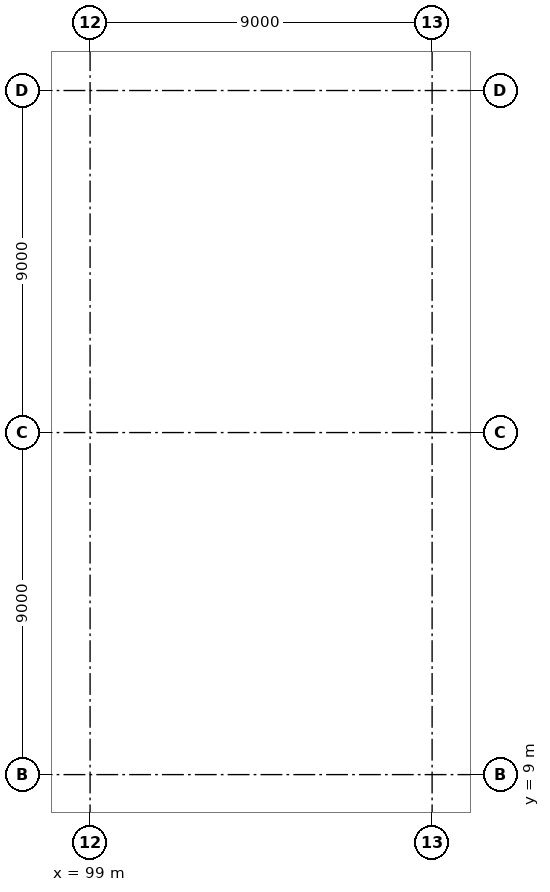
"""IFC4 building model, lengths in metres.
Left out: names, types, materials, properties, quantities, classifications, styles, units other than length and angle.
Written with IfcOpenShell. Run it as: python <this file> out.ifc"""

import sys

from ifc_helpers import new_model, si_unit, direction, frame, frame_2d, origin, origin_2d, place, context, subcontext, project, spatial, rectangle, hollow_rectangle, hollow_circle, extrude, element, fill, save


model = new_model("IFC4")
c1 = context("Model", 3, precision=1e-05, world=origin(), true_north=direction((0.0, 1.0)))
c2 = subcontext(c1, "Body", "Model", "MODEL_VIEW")
j1 = project(units=[si_unit("LENGTHUNIT", "METRE"), si_unit("PLANEANGLEUNIT", "RADIAN")], contexts=[c1])
p1 = place(None, origin())
s1 = spatial("IfcSite", under=j1, at=p1, CompositionType="ELEMENT")
p2 = place(p1, origin())
s2 = spatial("IfcBuilding", under=s1, at=p2, CompositionType="ELEMENT")
p3 = place(p2, frame((0.0, 0.0, 9.2)))
s3 = spatial("IfcBuildingStorey", under=s2, at=p3, CompositionType="ELEMENT", Elevation=9.2)
p4 = place(p3, frame((99.0, 9.0, 0.0), z_axis=(0.0, 0.0, 1.0), x_axis=(1.0, 0.0, 0.0)))
e1 = element("IfcColumn", 1, at=p4, inside=s3, PredefinedType="COLUMN", context=c2, shape_type="SweptSolid", body=[
    extrude(hollow_circle(Radius=0.203, WallThickness=0.013, at=origin_2d()), origin(), (0.0, 0.0, 1.0), 4.2),
])
p5 = place(p3, frame((99.0, 18.0, 0.0), z_axis=(0.0, 0.0, 1.0), x_axis=(1.0, 0.0, 0.0)))
e2 = element("IfcColumn", 2, at=p5, inside=s3, PredefinedType="COLUMN", context=c2, shape_type="SweptSolid", body=[
    extrude(hollow_circle(Radius=0.162, WallThickness=0.01, at=origin_2d()), origin(), (0.0, 0.0, 1.0), 4.2),
])
p6 = place(p3, frame((108.0, 18.0, 0.0), z_axis=(0.0, 0.0, 1.0), x_axis=(1.0, 0.0, 0.0)))
e3 = element("IfcColumn", 3, at=p6, inside=s3, PredefinedType="COLUMN", context=c2, shape_type="SweptSolid", body=[
    extrude(hollow_rectangle(XDim=0.3, YDim=0.3, WallThickness=0.016, InnerFilletRadius=0.024, OuterFilletRadius=0.04, at=origin_2d()), origin(), (0.0, 0.0, 1.0), 4.2),
])
p7 = place(p3, frame((99.0, 27.0, 0.0), z_axis=(0.0, 0.0, 1.0), x_axis=(1.0, 0.0, 0.0)))
e4 = element("IfcColumn", 4, at=p7, inside=s3, PredefinedType="COLUMN", context=c2, shape_type="SweptSolid", body=[
    extrude(hollow_circle(Radius=0.203, WallThickness=0.013, at=origin_2d()), origin(), (0.0, 0.0, 1.0), 4.2),
])
p8 = place(p3, frame((96.7, 8.92, 0.0), z_axis=(0.0, 0.0, 1.0), x_axis=(1.0, 0.0, 0.0)))
e5 = element("IfcWall", 5, at=p8, inside=s3, PredefinedType="SOLIDWALL", context=c2, shape_type="SweptSolid", body=[
    extrude(rectangle(XDim=2.097, YDim=0.2, at=frame_2d((1.048, 0.0))), origin(), (0.0, 0.0, 1.0), 3.125),
])
p9 = place(p8, frame((0.247, 0.0, 0.0)))
e6 = element("IfcOpeningElement", 6, at=p9, cuts=e5, PredefinedType="OPENING", context=c2, shape_type="SweptSolid", body=[
    extrude(rectangle(XDim=1.8, YDim=2.4, at=frame_2d((0.9, 1.2))), frame((0.0, 0.11, 0.0), z_axis=(0.0, -1.0, 0.0), x_axis=(1.0, 0.0, 0.0)), (0.0, 0.0, 1.0), 0.22),
])
p10 = place(p3, frame((99.08, 16.5, 0.0), z_axis=(0.0, 0.0, 1.0), x_axis=(0.0, 1.0, 0.0)))
e7 = element("IfcWall", 7, at=p10, inside=s3, PredefinedType="SOLIDWALL", context=c2, shape_type="SweptSolid", body=[
    extrude(rectangle(XDim=1.338, YDim=0.2, at=frame_2d((0.669, 0.0))), origin(), (0.0, 0.0, 1.0), 3.428),
])
p11 = place(p10, frame((0.169, 0.0, 0.0)))
e8 = element("IfcOpeningElement", 8, at=p11, cuts=e7, PredefinedType="OPENING", context=c2, shape_type="SweptSolid", body=[
    extrude(rectangle(XDim=1.0, YDim=2.4, at=frame_2d((0.5, 1.2))), frame((0.0, 0.11, 0.0), z_axis=(0.0, -1.0, 0.0), x_axis=(1.0, 0.0, 0.0)), (0.0, 0.0, 1.0), 0.22),
])
p12 = place(p3, frame((99.08, 18.162, 0.0), z_axis=(0.0, 0.0, 1.0), x_axis=(0.0, 1.0, 0.0)))
e9 = element("IfcWall", 9, at=p12, inside=s3, PredefinedType="SOLIDWALL", context=c2, shape_type="SweptSolid", body=[
    extrude(rectangle(XDim=1.338, YDim=0.2, at=frame_2d((0.669, 0.0))), origin(), (0.0, 0.0, 1.0), 3.428),
])
p13 = place(p12, frame((0.169, 0.0, 0.0)))
e10 = element("IfcOpeningElement", 10, at=p13, cuts=e9, PredefinedType="OPENING", context=c2, shape_type="SweptSolid", body=[
    extrude(rectangle(XDim=1.0, YDim=2.4, at=frame_2d((0.5, 1.2))), frame((0.0, 0.11, 0.0), z_axis=(0.0, -1.0, 0.0), x_axis=(1.0, 0.0, 0.0)), (0.0, 0.0, 1.0), 0.22),
])
p14 = place(p3, frame((107.85, 0.3, 0.0), z_axis=(0.0, 0.0, 1.0), x_axis=(0.0, 1.0, 0.0)))
e11 = element("IfcWall", 11, at=p14, inside=s3, PredefinedType="SOLIDWALL", context=c2, shape_type="SweptSolid", body=[
    extrude(rectangle(XDim=8.4, YDim=0.3, at=frame_2d((4.2, 0.0))), origin(), (0.0, 0.0, 1.0), 4.2),
])
p15 = place(p3, frame((103.5, 8.85, 0.0), z_axis=(0.0, 0.0, 1.0), x_axis=(1.0, 0.0, 0.0)))
e12 = element("IfcWall", 12, at=p15, inside=s3, PredefinedType="SOLIDWALL", context=c2, shape_type="SweptSolid", body=[
    extrude(rectangle(XDim=4.5, YDim=0.3, at=frame_2d((2.25, 0.0))), origin(), (0.0, 0.0, 1.0), 4.2),
])
p16 = place(p3, frame((103.65, 0.3, 0.0), z_axis=(0.0, 0.0, 1.0), x_axis=(0.0, 1.0, 0.0)))
e13 = element("IfcWall", 13, at=p16, inside=s3, PredefinedType="SOLIDWALL", context=c2, shape_type="SweptSolid", body=[
    extrude(rectangle(XDim=8.4, YDim=0.3, at=frame_2d((4.2, 0.0))), origin(), (0.0, 0.0, 1.0), 4.2),
])
p17 = place(p16, frame((0.25, 0.0, 0.0)))
e14 = element("IfcOpeningElement", 14, at=p17, cuts=e13, PredefinedType="OPENING", context=c2, shape_type="SweptSolid", body=[
    extrude(rectangle(XDim=1.2, YDim=2.1, at=frame_2d((0.6, 1.05))), frame((0.0, 0.16, 0.0), z_axis=(0.0, -1.0, 0.0), x_axis=(1.0, 0.0, 0.0)), (0.0, 0.0, 1.0), 0.32),
])
p18 = place(p3, frame((103.5, 27.15, 0.0), z_axis=(0.0, 0.0, 1.0), x_axis=(1.0, 0.0, 0.0)))
e15 = element("IfcWall", 15, at=p18, inside=s3, PredefinedType="SOLIDWALL", context=c2, shape_type="SweptSolid", body=[
    extrude(rectangle(XDim=4.5, YDim=0.3, at=frame_2d((2.25, 0.0))), origin(), (0.0, 0.0, 1.0), 4.2),
])
for number, where, z_axis, x_axis in (
    (16, (107.85, 27.3, 0.0), (0.0, 0.0, 1.0), (0.0, 1.0, 0.0)),
    (17, (103.65, 27.3, 0.0), (0.0, 0.0, 1.0), (0.0, 1.0, 0.0)),
):
    element("IfcWall", number, at=place(p3, frame(where, z_axis=z_axis, x_axis=x_axis)), inside=s3, PredefinedType="SOLIDWALL", context=c2, shape_type="SweptSolid", body=[
        extrude(rectangle(XDim=8.4, YDim=0.3, at=frame_2d((4.2, 0.0))), origin(), (0.0, 0.0, 1.0), 4.2),
    ])
p19 = place(p3, frame((99.203, 9.0, 0.0), z_axis=(0.0, 0.0, 1.0), x_axis=(1.0, 0.0, 0.0)))
e18 = element("IfcWall", 18, at=p19, inside=s3, PredefinedType="PARTITIONING", context=c2, shape_type="SweptSolid", body=[
    extrude(rectangle(XDim=4.297, YDim=0.15, at=frame_2d((2.148, 0.0))), origin(), (0.0, 0.0, 1.0), 3.502),
])
p20 = place(p19, frame((0.95, 0.0, 0.0)))
e19 = element("IfcOpeningElement", 19, at=p20, cuts=e18, PredefinedType="OPENING", context=c2, shape_type="SweptSolid", body=[
    extrude(rectangle(XDim=2.4, YDim=2.4, at=frame_2d((1.2, 1.2))), frame((0.0, 0.085, 0.0), z_axis=(0.0, -1.0, 0.0), x_axis=(1.0, 0.0, 0.0)), (0.0, 0.0, 1.0), 0.17),
])
p21 = place(p3, frame((99.203, 27.0, 0.0), z_axis=(0.0, 0.0, 1.0), x_axis=(1.0, 0.0, 0.0)))
e20 = element("IfcWall", 20, at=p21, inside=s3, PredefinedType="PARTITIONING", context=c2, shape_type="SweptSolid", body=[
    extrude(rectangle(XDim=4.297, YDim=0.2, at=frame_2d((2.148, 0.0))), origin(), (0.0, 0.0, 1.0), 3.502),
])
p22 = place(p21, frame((0.95, 0.0, 0.0)))
e21 = element("IfcOpeningElement", 21, at=p22, cuts=e20, PredefinedType="OPENING", context=c2, shape_type="SweptSolid", body=[
    extrude(rectangle(XDim=2.4, YDim=2.4, at=frame_2d((1.2, 1.2))), frame((0.0, 0.11, 0.0), z_axis=(0.0, -1.0, 0.0), x_axis=(1.0, 0.0, 0.0)), (0.0, 0.0, 1.0), 0.22),
])
p23 = place(p9, frame((1.8, 0.0, 0.0), z_axis=(0.0, 0.0, 1.0), x_axis=(-1.0, 0.0, 0.0)))
e22 = element("IfcDoor", 22, at=p23, inside=s3, OperationType="DOUBLE_DOOR_SINGLE_SWING", PredefinedType="DOOR", context=c2, shape_type="SweptSolid", body=[
    extrude(rectangle(XDim=1.8, YDim=2.4, at=frame_2d((0.9, 1.2))), frame((0.0, 0.025, 0.0), z_axis=(0.0, -1.0, 0.0), x_axis=(1.0, 0.0, 0.0)), (0.0, 0.0, 1.0), 0.05),
])
fill(e6, e22)
p24 = place(p11, frame((1.0, 0.0, 0.0), z_axis=(0.0, 0.0, 1.0), x_axis=(-1.0, 0.0, 0.0)))
e23 = element("IfcDoor", 23, at=p24, inside=s3, OperationType="SINGLE_SWING_LEFT", PredefinedType="DOOR", context=c2, shape_type="SweptSolid", body=[
    extrude(rectangle(XDim=1.0, YDim=2.4, at=frame_2d((0.5, 1.2))), frame((0.0, 0.025, 0.0), z_axis=(0.0, -1.0, 0.0), x_axis=(1.0, 0.0, 0.0)), (0.0, 0.0, 1.0), 0.05),
])
fill(e8, e23)
p25 = place(p13, frame((1.0, 0.0, 0.0), z_axis=(0.0, 0.0, 1.0), x_axis=(-1.0, 0.0, 0.0)))
e24 = element("IfcDoor", 24, at=p25, inside=s3, OperationType="SINGLE_SWING_LEFT", PredefinedType="DOOR", context=c2, shape_type="SweptSolid", body=[
    extrude(rectangle(XDim=1.0, YDim=2.4, at=frame_2d((0.5, 1.2))), frame((0.0, 0.025, 0.0), z_axis=(0.0, -1.0, 0.0), x_axis=(1.0, 0.0, 0.0)), (0.0, 0.0, 1.0), 0.05),
])
fill(e10, e24)
p26 = place(p20, frame((2.4, 0.0, 0.0), z_axis=(0.0, 0.0, 1.0), x_axis=(-1.0, 0.0, 0.0)))
e25 = element("IfcDoor", 25, at=p26, inside=s3, OperationType="DOUBLE_DOOR_SINGLE_SWING", PredefinedType="DOOR", context=c2, shape_type="SweptSolid", body=[
    extrude(rectangle(XDim=2.4, YDim=2.4, at=frame_2d((1.2, 1.2))), frame((0.0, 0.025, 0.0), z_axis=(0.0, -1.0, 0.0), x_axis=(1.0, 0.0, 0.0)), (0.0, 0.0, 1.0), 0.05),
])
fill(e19, e25)
p27 = place(p22, frame((2.4, 0.0, 0.0), z_axis=(0.0, 0.0, 1.0), x_axis=(-1.0, 0.0, 0.0)))
e26 = element("IfcDoor", 26, at=p27, inside=s3, OperationType="DOUBLE_DOOR_SINGLE_SWING", PredefinedType="DOOR", context=c2, shape_type="SweptSolid", body=[
    extrude(rectangle(XDim=2.4, YDim=2.4, at=frame_2d((1.2, 1.2))), frame((0.0, 0.025, 0.0), z_axis=(0.0, -1.0, 0.0), x_axis=(1.0, 0.0, 0.0)), (0.0, 0.0, 1.0), 0.05),
])
fill(e21, e26)
save(model, sys.argv[1])
